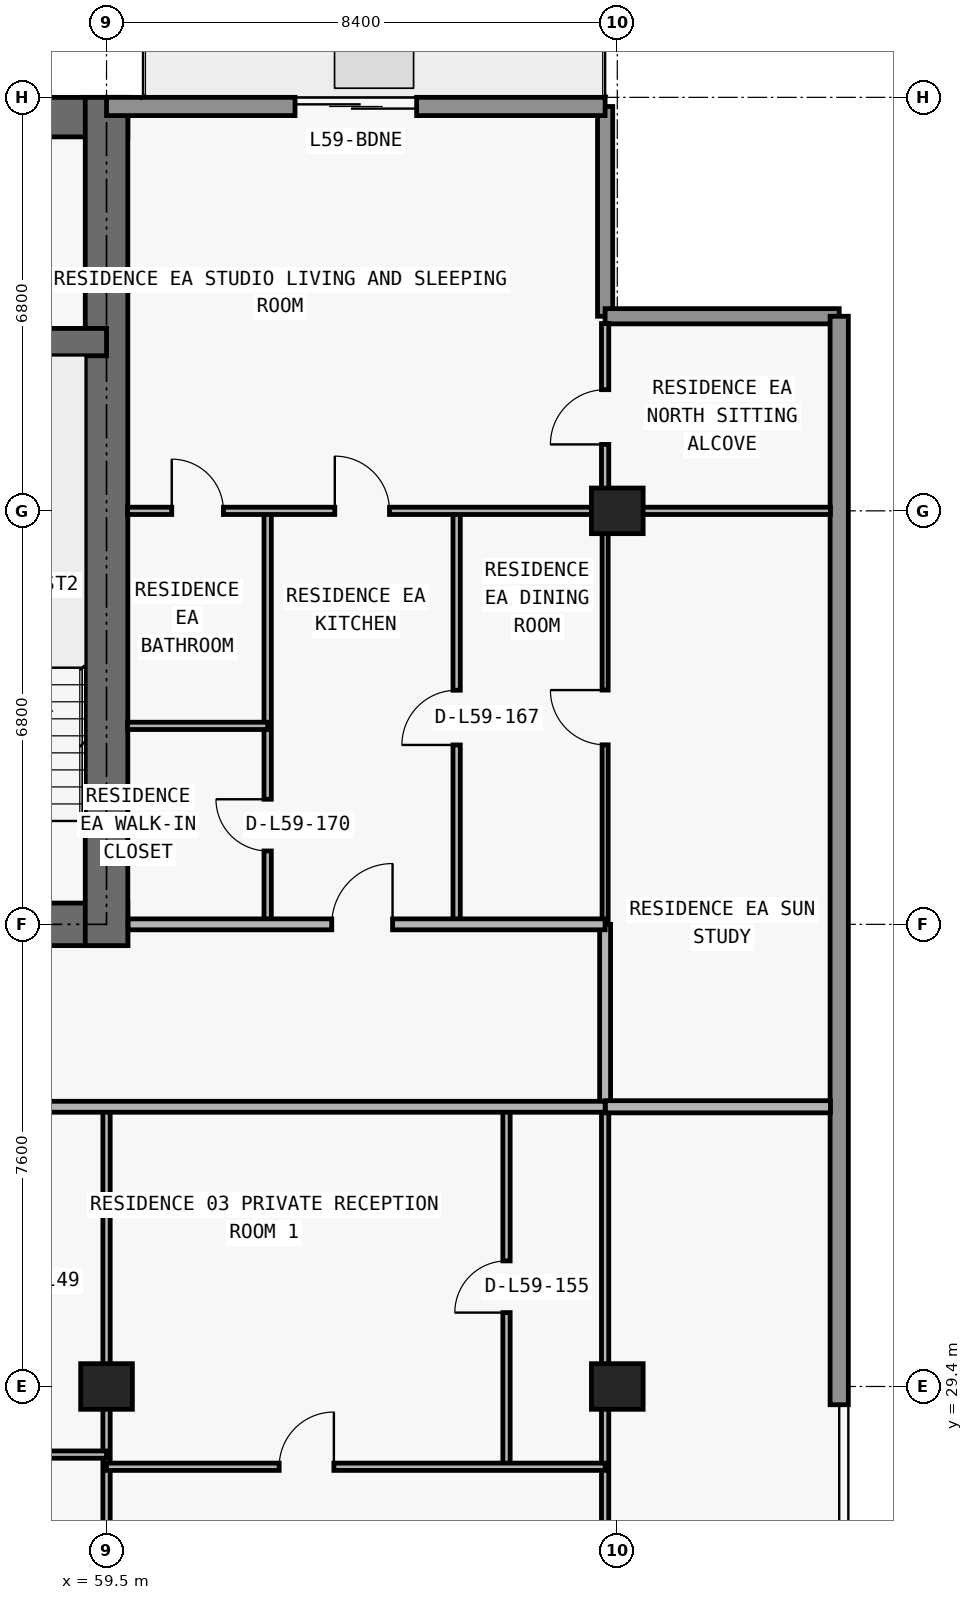
"""IFC4 building model, lengths in metres.
Left out: names, types, materials, properties, quantities, classifications, styles, units other than length and angle.
Written with IfcOpenShell. Run it as: python <this file> out.ifc"""

import sys

from ifc_helpers import new_model, si_unit, direction, frame, frame_2d, origin, origin_2d, place, context, subcontext, project, spatial, rectangle, extrude, element, fill, save


model = new_model("IFC4")
c1 = context("Model", 3, precision=1e-05, world=origin(), true_north=direction((0.0, 1.0)))
c2 = subcontext(c1, "Body", "Model", "MODEL_VIEW")
j1 = project(units=[si_unit("LENGTHUNIT", "METRE"), si_unit("PLANEANGLEUNIT", "RADIAN")], contexts=[c1])
p1 = place(None, origin())
s1 = spatial("IfcSite", under=j1, at=p1, CompositionType="ELEMENT")
p2 = place(p1, origin())
s2 = spatial("IfcBuilding", under=s1, at=p2, CompositionType="ELEMENT")
p3 = place(p2, frame((0.0, 0.0, 211.5)))
s3 = spatial("IfcBuildingStorey", under=s2, at=p3, CompositionType="ELEMENT", Elevation=211.5)
for number, where, z_axis, x_axis in (
    (1, (59.5, 29.4, 0.0), (0.0, 0.0, 1.0), (1.0, 0.0, 0.0)),
    (2, (67.9, 29.4, 0.0), (0.0, 0.0, 1.0), (1.0, 0.0, 0.0)),
    (3, (67.9, 43.8, 0.0), (0.0, 0.0, 1.0), (1.0, 0.0, 0.0)),
):
    element("IfcColumn", number, at=place(p3, frame(where, z_axis=z_axis, x_axis=x_axis)), inside=s3, PredefinedType="COLUMN", context=c2, shape_type="SweptSolid", body=[
        extrude(rectangle(XDim=0.85, YDim=0.75, at=origin_2d()), origin(), (0.0, 0.0, 1.0), 3.05),
    ])
p4 = place(p3, frame((17.95, 37.0, 0.0), z_axis=(0.0, 0.0, 1.0), x_axis=(1.0, 0.0, 0.0)))
e4 = element("IfcWall", 4, at=p4, inside=s3, PredefinedType="SHEAR", context=c2, shape_type="SweptSolid", body=[
    extrude(rectangle(XDim=41.9, YDim=0.7, at=frame_2d((20.95, 0.0))), origin(), (0.0, 0.0, 1.0), 3.05),
])
p5 = place(p4, frame((14.35, 0.0, 0.0)))
e5 = element("IfcOpeningElement", 5, at=p5, cuts=e4, PredefinedType="OPENING", context=c2, shape_type="SweptSolid", body=[
    extrude(rectangle(XDim=1.1, YDim=2.15, at=frame_2d((0.55, 1.075))), frame((0.0, 0.36, 0.0), z_axis=(0.0, -1.0, 0.0), x_axis=(1.0, 0.0, 0.0)), (0.0, 0.0, 1.0), 0.72),
])
p6 = place(p4, frame((6.2, 0.0, 0.0)))
e6 = element("IfcOpeningElement", 6, at=p6, cuts=e4, PredefinedType="OPENING", context=c2, shape_type="SweptSolid", body=[
    extrude(rectangle(XDim=1.05, YDim=2.15, at=frame_2d((0.525, 1.075))), frame((0.0, 0.36, 0.0), z_axis=(0.0, -1.0, 0.0), x_axis=(1.0, 0.0, 0.0)), (0.0, 0.0, 1.0), 0.72),
])
p7 = place(p4, frame((34.7, 0.0, 0.0)))
e7 = element("IfcOpeningElement", 7, at=p7, cuts=e4, PredefinedType="OPENING", context=c2, shape_type="SweptSolid", body=[
    extrude(rectangle(XDim=1.05, YDim=2.15, at=frame_2d((0.525, 1.075))), frame((0.0, 0.36, 0.0), z_axis=(0.0, -1.0, 0.0), x_axis=(1.0, 0.0, 0.0)), (0.0, 0.0, 1.0), 0.72),
])
p8 = place(p4, frame((10.812, 0.0, 0.0)))
e8 = element("IfcOpeningElement", 8, at=p8, cuts=e4, PredefinedType="OPENING", context=c2, shape_type="SweptSolid", body=[
    extrude(rectangle(XDim=1.05, YDim=2.15, at=frame_2d((0.525, 1.075))), frame((0.0, 0.36, 0.0), z_axis=(0.0, -1.0, 0.0), x_axis=(1.0, 0.0, 0.0)), (0.0, 0.0, 1.0), 0.72),
])
p9 = place(p4, frame((24.05, 0.0, 0.0)))
e9 = element("IfcOpeningElement", 9, at=p9, cuts=e4, PredefinedType="OPENING", context=c2, shape_type="SweptSolid", body=[
    extrude(rectangle(XDim=1.05, YDim=2.15, at=frame_2d((0.525, 1.075))), frame((0.0, 0.36, 0.0), z_axis=(0.0, -1.0, 0.0), x_axis=(1.0, 0.0, 0.0)), (0.0, 0.0, 1.0), 0.72),
])
p10 = place(p3, frame((17.95, 50.275, 0.0), z_axis=(0.0, 0.0, 1.0), x_axis=(1.0, 0.0, 0.0)))
e10 = element("IfcWall", 10, at=p10, inside=s3, PredefinedType="SHEAR", context=c2, shape_type="SweptSolid", body=[
    extrude(rectangle(XDim=41.9, YDim=0.65, at=frame_2d((20.95, 0.0))), origin(), (0.0, 0.0, 1.0), 3.05),
])
p11 = place(p3, frame((59.5, 36.65, 0.0), z_axis=(0.0, 0.0, 1.0), x_axis=(0.0, 1.0, 0.0)))
e11 = element("IfcWall", 11, at=p11, inside=s3, PredefinedType="SHEAR", context=c2, shape_type="SweptSolid", body=[
    extrude(rectangle(XDim=13.95, YDim=0.7, at=frame_2d((6.975, 0.0))), origin(), (0.0, 0.0, 1.0), 3.05),
])
p12 = place(p3, frame((18.3, 46.575, 0.0), z_axis=(0.0, 0.0, 1.0), x_axis=(1.0, 0.0, 0.0)))
e12 = element("IfcWall", 12, at=p12, inside=s3, PredefinedType="SHEAR", context=c2, shape_type="SweptSolid", body=[
    extrude(rectangle(XDim=41.2, YDim=0.45, at=frame_2d((20.6, 0.0))), origin(), (0.0, 0.0, 1.0), 3.05),
])
p13 = place(p12, frame((7.575, 0.0, 0.0)))
e13 = element("IfcOpeningElement", 13, at=p13, cuts=e12, PredefinedType="OPENING", context=c2, shape_type="SweptSolid", body=[
    extrude(rectangle(XDim=1.05, YDim=2.15, at=frame_2d((0.525, 1.075))), frame((0.0, 0.235, 0.0), z_axis=(0.0, -1.0, 0.0), x_axis=(1.0, 0.0, 0.0)), (0.0, 0.0, 1.0), 0.47),
])
p14 = place(p12, frame((32.625, 0.0, 0.0)))
e14 = element("IfcOpeningElement", 14, at=p14, cuts=e12, PredefinedType="OPENING", context=c2, shape_type="SweptSolid", body=[
    extrude(rectangle(XDim=1.05, YDim=2.15, at=frame_2d((0.525, 1.075))), frame((0.0, 0.235, 0.0), z_axis=(0.0, -1.0, 0.0), x_axis=(1.0, 0.0, 0.0)), (0.0, 0.0, 1.0), 0.47),
])
p15 = place(p3, frame((67.7, 50.45, 0.0), z_axis=(0.0, 0.0, 1.0), x_axis=(0.0, -1.0, 0.0)))
e15 = element("IfcWall", 15, at=p15, inside=s3, PredefinedType="ELEMENTEDWALL", context=c2, shape_type="SweptSolid", body=[
    extrude(rectangle(XDim=3.45, YDim=0.25, at=frame_2d((1.725, 0.0))), origin(), (0.0, 0.0, 1.0), 3.05),
])
p16 = place(p3, frame((67.7, 47.0, 0.0), z_axis=(0.0, 0.0, 1.0), x_axis=(1.0, 0.0, 0.0)))
e16 = element("IfcWall", 16, at=p16, inside=s3, PredefinedType="ELEMENTEDWALL", context=c2, shape_type="SweptSolid", body=[
    extrude(rectangle(XDim=3.85, YDim=0.25, at=frame_2d((1.925, 0.0))), origin(), (0.0, 0.0, 1.0), 3.05),
])
p17 = place(p3, frame((71.55, 47.0, 0.0), z_axis=(0.0, 0.0, 1.0), x_axis=(0.0, -1.0, 0.0)))
e17 = element("IfcWall", 17, at=p17, inside=s3, PredefinedType="STANDARD", context=c2, shape_type="SweptSolid", body=[
    extrude(rectangle(XDim=17.9, YDim=0.3, at=frame_2d((8.95, 0.0))), origin(), (0.0, 0.0, 1.0), 3.05),
])
p18 = place(p3, frame((59.5, 50.45, 0.0), z_axis=(0.0, 0.0, 1.0), x_axis=(1.0, 0.0, 0.0)))
e18 = element("IfcWall", 18, at=p18, inside=s3, PredefinedType="STANDARD", context=c2, shape_type="SweptSolid", body=[
    extrude(rectangle(XDim=8.2, YDim=0.3, at=frame_2d((4.1, 0.0))), origin(), (0.0, 0.0, 1.0), 3.05),
])
p19 = place(p18, frame((3.1, 0.0, 0.0)))
e19 = element("IfcOpeningElement", 19, at=p19, cuts=e18, PredefinedType="OPENING", context=c2, shape_type="SweptSolid", body=[
    extrude(rectangle(XDim=2.0, YDim=2.3, at=frame_2d((1.0, 1.15))), frame((0.0, 0.16, 0.0), z_axis=(0.0, -1.0, 0.0), x_axis=(1.0, 0.0, 0.0)), (0.0, 0.0, 1.0), 0.32),
])
p20 = place(p3, frame((59.5, 11.24, 0.0), z_axis=(0.0, 0.0, 1.0), x_axis=(0.0, 1.0, 0.0)))
e20 = element("IfcWall", 20, at=p20, inside=s3, PredefinedType="PARTITIONING", context=c2, shape_type="SweptSolid", body=[
    extrude(rectangle(XDim=22.76, YDim=0.12, at=frame_2d((11.38, 0.0))), origin(), (0.0, 0.0, 1.0), 2.263),
])
p21 = place(p20, frame((14.19, 0.0, 0.0)))
e21 = element("IfcOpeningElement", 21, at=p21, cuts=e20, PredefinedType="OPENING", context=c2, shape_type="SweptSolid", body=[
    extrude(rectangle(XDim=0.9, YDim=2.15, at=frame_2d((0.45, 1.075))), frame((0.0, 0.07, 0.0), z_axis=(0.0, -1.0, 0.0), x_axis=(1.0, 0.0, 0.0)), (0.0, 0.0, 1.0), 0.14),
])
p22 = place(p3, frame((62.15, 37.0, 0.0), z_axis=(0.0, 0.0, 1.0), x_axis=(0.0, 1.0, 0.0)))
e22 = element("IfcWall", 22, at=p22, inside=s3, PredefinedType="PARTITIONING", context=c2, shape_type="SweptSolid", body=[
    extrude(rectangle(XDim=6.8, YDim=0.12, at=frame_2d((3.4, 0.0))), origin(), (0.0, 0.0, 1.0), 3.05),
])
p23 = place(p22, frame((1.207, 0.0, 0.0)))
e23 = element("IfcOpeningElement", 23, at=p23, cuts=e22, PredefinedType="OPENING", context=c2, shape_type="SweptSolid", body=[
    extrude(rectangle(XDim=0.85, YDim=2.1, at=frame_2d((0.425, 1.05))), frame((0.0, 0.07, 0.0), z_axis=(0.0, -1.0, 0.0), x_axis=(1.0, 0.0, 0.0)), (0.0, 0.0, 1.0), 0.14),
])
p24 = place(p3, frame((65.258, 37.0, 0.0), z_axis=(0.0, 0.0, 1.0), x_axis=(0.0, 1.0, 0.0)))
e24 = element("IfcWall", 24, at=p24, inside=s3, PredefinedType="PARTITIONING", context=c2, shape_type="SweptSolid", body=[
    extrude(rectangle(XDim=6.8, YDim=0.12, at=frame_2d((3.4, 0.0))), origin(), (0.0, 0.0, 1.0), 3.05),
])
p25 = place(p24, frame((2.95, 0.0, 0.0)))
e25 = element("IfcOpeningElement", 25, at=p25, cuts=e24, PredefinedType="OPENING", context=c2, shape_type="SweptSolid", body=[
    extrude(rectangle(XDim=0.9, YDim=2.15, at=frame_2d((0.45, 1.075))), frame((0.0, 0.07, 0.0), z_axis=(0.0, -1.0, 0.0), x_axis=(1.0, 0.0, 0.0)), (0.0, 0.0, 1.0), 0.14),
])
p26 = place(p3, frame((66.078, 28.08, 0.0), z_axis=(0.0, 0.0, 1.0), x_axis=(0.0, 1.0, 0.0)))
e26 = element("IfcWall", 26, at=p26, inside=s3, PredefinedType="PARTITIONING", context=c2, shape_type="SweptSolid", body=[
    extrude(rectangle(XDim=5.92, YDim=0.12, at=frame_2d((2.96, 0.0))), origin(), (0.0, 0.0, 1.0), 3.05),
])
p27 = place(p26, frame((2.535, 0.0, 0.0)))
e27 = element("IfcOpeningElement", 27, at=p27, cuts=e26, PredefinedType="OPENING", context=c2, shape_type="SweptSolid", body=[
    extrude(rectangle(XDim=0.85, YDim=2.1, at=frame_2d((0.425, 1.05))), frame((0.0, 0.07, 0.0), z_axis=(0.0, -1.0, 0.0), x_axis=(1.0, 0.0, 0.0)), (0.0, 0.0, 1.0), 0.14),
])
p28 = place(p3, frame((67.7, 11.32, 0.0), z_axis=(0.0, 0.0, 1.0), x_axis=(0.0, 1.0, 0.0)))
e28 = element("IfcWall", 28, at=p28, inside=s3, PredefinedType="PARTITIONING", context=c2, shape_type="SweptSolid", body=[
    extrude(rectangle(XDim=22.68, YDim=0.12, at=frame_2d((11.34, 0.0))), origin(), (0.0, 0.0, 1.0), 2.263),
])
p29 = place(p28, frame((14.11, 0.0, 0.0)))
e29 = element("IfcOpeningElement", 29, at=p29, cuts=e28, PredefinedType="OPENING", context=c2, shape_type="SweptSolid", body=[
    extrude(rectangle(XDim=0.9, YDim=2.15, at=frame_2d((0.45, 1.075))), frame((0.0, 0.07, 0.0), z_axis=(0.0, -1.0, 0.0), x_axis=(1.0, 0.0, 0.0)), (0.0, 0.0, 1.0), 0.14),
])
p30 = place(p3, frame((67.7, 34.005, 0.0), z_axis=(0.0, 0.0, 1.0), x_axis=(0.0, 1.0, 0.0)))
e30 = element("IfcWall", 30, at=p30, inside=s3, PredefinedType="PARTITIONING", context=c2, shape_type="SweptSolid", body=[
    extrude(rectangle(XDim=2.995, YDim=0.18, at=frame_2d((1.498, 0.0))), origin(), (0.0, 0.0, 1.0), 2.263),
])
p31 = place(p3, frame((67.7, 37.005, 0.0), z_axis=(0.0, 0.0, 1.0), x_axis=(0.0, 1.0, 0.0)))
e31 = element("IfcWall", 31, at=p31, inside=s3, PredefinedType="MOVABLE", context=c2, shape_type="SweptSolid", body=[
    extrude(rectangle(XDim=6.795, YDim=0.1, at=frame_2d((3.397, 0.0))), origin(), (0.0, 0.0, 1.0), 2.263),
])
p32 = place(p31, frame((2.948, 0.0, 0.0)))
e32 = element("IfcOpeningElement", 32, at=p32, cuts=e31, PredefinedType="OPENING", context=c2, shape_type="SweptSolid", body=[
    extrude(rectangle(XDim=0.9, YDim=2.15, at=frame_2d((0.45, 1.075))), frame((0.0, 0.06, 0.0), z_axis=(0.0, -1.0, 0.0), x_axis=(1.0, 0.0, 0.0)), (0.0, 0.0, 1.0), 0.12),
])
p33 = place(p3, frame((67.7, 43.805, 0.0), z_axis=(0.0, 0.0, 1.0), x_axis=(0.0, 1.0, 0.0)))
e33 = element("IfcWall", 33, at=p33, inside=s3, PredefinedType="PARTITIONING", context=c2, shape_type="SweptSolid", body=[
    extrude(rectangle(XDim=3.075, YDim=0.12, at=frame_2d((1.538, 0.0))), origin(), (0.0, 0.0, 1.0), 3.05),
])
p34 = place(p33, frame((1.087, 0.0, 0.0)))
e34 = element("IfcOpeningElement", 34, at=p34, cuts=e33, PredefinedType="OPENING", context=c2, shape_type="SweptSolid", body=[
    extrude(rectangle(XDim=0.9, YDim=2.15, at=frame_2d((0.45, 1.075))), frame((0.0, 0.07, 0.0), z_axis=(0.0, -1.0, 0.0), x_axis=(1.0, 0.0, 0.0)), (0.0, 0.0, 1.0), 0.14),
])
p35 = place(p3, frame((59.5, 28.08, 0.0), z_axis=(0.0, 0.0, 1.0), x_axis=(1.0, 0.0, 0.0)))
e35 = element("IfcWall", 35, at=p35, inside=s3, PredefinedType="PARTITIONING", context=c2, shape_type="SweptSolid", body=[
    extrude(rectangle(XDim=8.2, YDim=0.12, at=frame_2d((4.1, 0.0))), origin(), (0.0, 0.0, 1.0), 3.05),
])
p36 = place(p35, frame((2.839, 0.0, 0.0)))
e36 = element("IfcOpeningElement", 36, at=p36, cuts=e35, PredefinedType="OPENING", context=c2, shape_type="SweptSolid", body=[
    extrude(rectangle(XDim=0.9, YDim=2.15, at=frame_2d((0.45, 1.075))), frame((0.0, 0.07, 0.0), z_axis=(0.0, -1.0, 0.0), x_axis=(1.0, 0.0, 0.0)), (0.0, 0.0, 1.0), 0.14),
])
p37 = place(p3, frame((51.32, 28.28, 0.0), z_axis=(0.0, 0.0, 1.0), x_axis=(1.0, 0.0, 0.0)))
e37 = element("IfcWall", 37, at=p37, inside=s3, PredefinedType="PARTITIONING", context=c2, shape_type="SweptSolid", body=[
    extrude(rectangle(XDim=8.18, YDim=0.12, at=frame_2d((4.09, 0.0))), origin(), (0.0, 0.0, 1.0), 3.05),
])
p38 = place(p37, frame((1.33, 0.0, 0.0)))
e38 = element("IfcOpeningElement", 38, at=p38, cuts=e37, PredefinedType="OPENING", context=c2, shape_type="SweptSolid", body=[
    extrude(rectangle(XDim=0.9, YDim=2.15, at=frame_2d((0.45, 1.075))), frame((0.0, 0.07, 0.0), z_axis=(0.0, -1.0, 0.0), x_axis=(1.0, 0.0, 0.0)), (0.0, 0.0, 1.0), 0.14),
])
p39 = place(p3, frame((26.7, 34.0, 0.0), z_axis=(0.0, 0.0, 1.0), x_axis=(1.0, 0.0, 0.0)))
e39 = element("IfcWall", 39, at=p39, inside=s3, PredefinedType="PARTITIONING", context=c2, shape_type="SweptSolid", body=[
    extrude(rectangle(XDim=41.0, YDim=0.18, at=frame_2d((20.5, 0.0))), origin(), (0.0, 0.0, 1.0), 3.05),
])
p40 = place(p39, frame((2.796, 0.0, 0.0)))
e40 = element("IfcOpeningElement", 40, at=p40, cuts=e39, PredefinedType="OPENING", context=c2, shape_type="SweptSolid", body=[
    extrude(rectangle(XDim=1.0, YDim=2.2, at=frame_2d((0.5, 1.1))), frame((0.0, 0.1, 0.0), z_axis=(0.0, -1.0, 0.0), x_axis=(1.0, 0.0, 0.0)), (0.0, 0.0, 1.0), 0.2),
])
p41 = place(p39, frame((27.199, 0.0, 0.0)))
e41 = element("IfcOpeningElement", 41, at=p41, cuts=e39, PredefinedType="OPENING", context=c2, shape_type="SweptSolid", body=[
    extrude(rectangle(XDim=1.0, YDim=2.2, at=frame_2d((0.5, 1.1))), frame((0.0, 0.1, 0.0), z_axis=(0.0, -1.0, 0.0), x_axis=(1.0, 0.0, 0.0)), (0.0, 0.0, 1.0), 0.2),
])
p42 = place(p3, frame((67.705, 34.0, 0.0), z_axis=(0.0, 0.0, 1.0), x_axis=(1.0, 0.0, 0.0)))
e42 = element("IfcWall", 42, at=p42, inside=s3, PredefinedType="PARTITIONING", context=c2, shape_type="SweptSolid", body=[
    extrude(rectangle(XDim=3.7, YDim=0.2, at=frame_2d((1.85, 0.0))), origin(), (0.0, 0.0, 1.0), 3.05),
])
p43 = place(p3, frame((59.855, 37.0, 0.0), z_axis=(0.0, 0.0, 1.0), x_axis=(1.0, 0.0, 0.0)))
e43 = element("IfcWall", 43, at=p43, inside=s3, PredefinedType="PARTITIONING", context=c2, shape_type="SweptSolid", body=[
    extrude(rectangle(XDim=7.845, YDim=0.18, at=frame_2d((3.922, 0.0))), origin(), (0.0, 0.0, 1.0), 3.05),
])
p44 = place(p43, frame((3.349, 0.0, 0.0)))
e44 = element("IfcOpeningElement", 44, at=p44, cuts=e43, PredefinedType="OPENING", context=c2, shape_type="SweptSolid", body=[
    extrude(rectangle(XDim=1.0, YDim=2.2, at=frame_2d((0.5, 1.1))), frame((0.0, 0.1, 0.0), z_axis=(0.0, -1.0, 0.0), x_axis=(1.0, 0.0, 0.0)), (0.0, 0.0, 1.0), 0.2),
])
p45 = place(p3, frame((59.845, 40.264, 0.0), z_axis=(0.0, 0.0, 1.0), x_axis=(1.0, 0.0, 0.0)))
e45 = element("IfcWall", 45, at=p45, inside=s3, PredefinedType="PARTITIONING", context=c2, shape_type="SweptSolid", body=[
    extrude(rectangle(XDim=2.305, YDim=0.12, at=frame_2d((1.152, 0.0))), origin(), (0.0, 0.0, 1.0), 3.05),
])
p46 = place(p3, frame((59.845, 43.8, 0.0), z_axis=(0.0, 0.0, 1.0), x_axis=(1.0, 0.0, 0.0)))
e46 = element("IfcWall", 46, at=p46, inside=s3, PredefinedType="PARTITIONING", context=c2, shape_type="SweptSolid", body=[
    extrude(rectangle(XDim=11.56, YDim=0.12, at=frame_2d((5.78, 0.0))), origin(), (0.0, 0.0, 1.0), 2.418),
])
p47 = place(p46, frame((3.409, 0.0, 0.0)))
e47 = element("IfcOpeningElement", 47, at=p47, cuts=e46, PredefinedType="OPENING", context=c2, shape_type="SweptSolid", body=[
    extrude(rectangle(XDim=0.9, YDim=2.15, at=frame_2d((0.45, 1.075))), frame((0.0, 0.07, 0.0), z_axis=(0.0, -1.0, 0.0), x_axis=(1.0, 0.0, 0.0)), (0.0, 0.0, 1.0), 0.14),
])
p48 = place(p46, frame((0.728, 0.0, 0.0)))
e48 = element("IfcOpeningElement", 48, at=p48, cuts=e46, PredefinedType="OPENING", context=c2, shape_type="SweptSolid", body=[
    extrude(rectangle(XDim=0.85, YDim=2.1, at=frame_2d((0.425, 1.05))), frame((0.0, 0.07, 0.0), z_axis=(0.0, -1.0, 0.0), x_axis=(1.0, 0.0, 0.0)), (0.0, 0.0, 1.0), 0.14),
])
p49 = place(p19, origin())
e49 = element("IfcDoor", 49, at=p49, inside=s3, OperationType="DOUBLE_DOOR_SLIDING", PredefinedType="DOOR", context=c2, shape_type="SweptSolid", body=[
    extrude(rectangle(XDim=2.0, YDim=2.3, at=frame_2d((1.0, 1.15))), frame((0.0, 0.025, 0.0), z_axis=(0.0, -1.0, 0.0), x_axis=(1.0, 0.0, 0.0)), (0.0, 0.0, 1.0), 0.05),
])
fill(e19, e49)
p50 = place(p36, origin())
e50 = element("IfcDoor", 50, at=p50, inside=s3, OperationType="SINGLE_SWING_RIGHT", PredefinedType="DOOR", context=c2, shape_type="SweptSolid", body=[
    extrude(rectangle(XDim=0.9, YDim=2.15, at=frame_2d((0.45, 1.075))), frame((0.0, 0.025, 0.0), z_axis=(0.0, -1.0, 0.0), x_axis=(1.0, 0.0, 0.0)), (0.0, 0.0, 1.0), 0.05),
])
fill(e36, e50)
p51 = place(p27, origin())
e51 = element("IfcDoor", 51, at=p51, inside=s3, OperationType="SINGLE_SWING_LEFT", PredefinedType="DOOR", context=c2, shape_type="SweptSolid", body=[
    extrude(rectangle(XDim=0.85, YDim=2.1, at=frame_2d((0.425, 1.05))), frame((0.0, 0.025, 0.0), z_axis=(0.0, -1.0, 0.0), x_axis=(1.0, 0.0, 0.0)), (0.0, 0.0, 1.0), 0.05),
])
fill(e27, e51)
p52 = place(p25, origin())
e52 = element("IfcDoor", 52, at=p52, inside=s3, OperationType="SINGLE_SWING_LEFT", PredefinedType="DOOR", context=c2, shape_type="SweptSolid", body=[
    extrude(rectangle(XDim=0.9, YDim=2.15, at=frame_2d((0.45, 1.075))), frame((0.0, 0.025, 0.0), z_axis=(0.0, -1.0, 0.0), x_axis=(1.0, 0.0, 0.0)), (0.0, 0.0, 1.0), 0.05),
])
fill(e25, e52)
p53 = place(p44, origin())
e53 = element("IfcDoor", 53, at=p53, inside=s3, OperationType="SINGLE_SWING_RIGHT", PredefinedType="DOOR", context=c2, shape_type="SweptSolid", body=[
    extrude(rectangle(XDim=1.0, YDim=2.2, at=frame_2d((0.5, 1.1))), frame((0.0, 0.025, 0.0), z_axis=(0.0, -1.0, 0.0), x_axis=(1.0, 0.0, 0.0)), (0.0, 0.0, 1.0), 0.05),
])
fill(e44, e53)
p54 = place(p47, origin())
e54 = element("IfcDoor", 54, at=p54, inside=s3, OperationType="SINGLE_SWING_LEFT", PredefinedType="DOOR", context=c2, shape_type="SweptSolid", body=[
    extrude(rectangle(XDim=0.9, YDim=2.15, at=frame_2d((0.45, 1.075))), frame((0.0, 0.025, 0.0), z_axis=(0.0, -1.0, 0.0), x_axis=(1.0, 0.0, 0.0)), (0.0, 0.0, 1.0), 0.05),
])
fill(e47, e54)
p55 = place(p23, origin())
e55 = element("IfcDoor", 55, at=p55, inside=s3, OperationType="SINGLE_SWING_RIGHT", PredefinedType="DOOR", context=c2, shape_type="SweptSolid", body=[
    extrude(rectangle(XDim=0.85, YDim=2.1, at=frame_2d((0.425, 1.05))), frame((0.0, 0.025, 0.0), z_axis=(0.0, -1.0, 0.0), x_axis=(1.0, 0.0, 0.0)), (0.0, 0.0, 1.0), 0.05),
])
fill(e23, e55)
p56 = place(p48, origin())
e56 = element("IfcDoor", 56, at=p56, inside=s3, OperationType="SINGLE_SWING_LEFT", PredefinedType="DOOR", context=c2, shape_type="SweptSolid", body=[
    extrude(rectangle(XDim=0.85, YDim=2.1, at=frame_2d((0.425, 1.05))), frame((0.0, 0.025, 0.0), z_axis=(0.0, -1.0, 0.0), x_axis=(1.0, 0.0, 0.0)), (0.0, 0.0, 1.0), 0.05),
])
fill(e48, e56)
p57 = place(p32, origin())
e57 = element("IfcDoor", 57, at=p57, inside=s3, OperationType="SINGLE_SWING_RIGHT", PredefinedType="DOOR", context=c2, shape_type="SweptSolid", body=[
    extrude(rectangle(XDim=0.9, YDim=2.15, at=frame_2d((0.45, 1.075))), frame((0.0, 0.025, 0.0), z_axis=(0.0, -1.0, 0.0), x_axis=(1.0, 0.0, 0.0)), (0.0, 0.0, 1.0), 0.05),
])
fill(e32, e57)
p58 = place(p34, origin())
e58 = element("IfcDoor", 58, at=p58, inside=s3, OperationType="SINGLE_SWING_LEFT", PredefinedType="DOOR", context=c2, shape_type="SweptSolid", body=[
    extrude(rectangle(XDim=0.9, YDim=2.15, at=frame_2d((0.45, 1.075))), frame((0.0, 0.025, 0.0), z_axis=(0.0, -1.0, 0.0), x_axis=(1.0, 0.0, 0.0)), (0.0, 0.0, 1.0), 0.05),
])
fill(e34, e58)
save(model, sys.argv[1])
